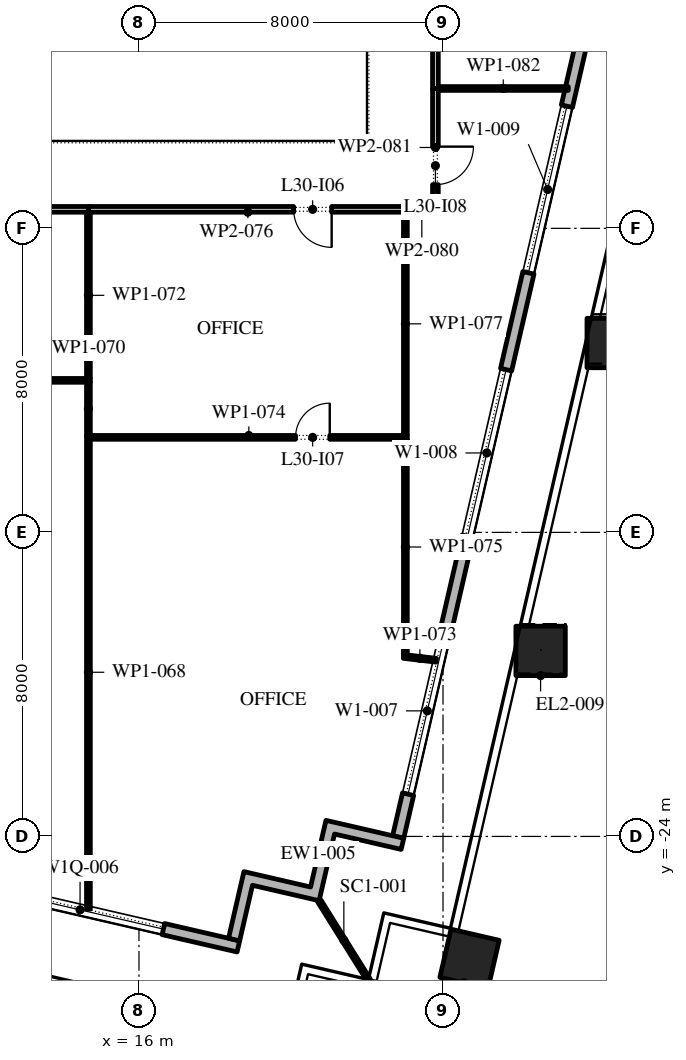
"""IFC4 building model, lengths in metres.
Left out: names, types, materials, properties, quantities, classifications, styles, units other than length and angle.
Written with IfcOpenShell. Run it as: python <this file> out.ifc"""

import sys

from ifc_helpers import new_model, si_unit, direction, frame, frame_2d, origin, origin_2d, place, context, subcontext, project, spatial, polyline, rectangle, outline, extrude, element, fill, save


model = new_model("IFC4")
c1 = context("Model", 3, precision=1e-05, world=origin(), true_north=direction((0.0, 1.0)))
c2 = subcontext(c1, "Body", "Model", "MODEL_VIEW")
j1 = project(units=[si_unit("LENGTHUNIT", "METRE"), si_unit("PLANEANGLEUNIT", "RADIAN")], contexts=[c1])
p1 = place(None, origin())
s1 = spatial("IfcSite", under=j1, at=p1, CompositionType="ELEMENT")
p2 = place(p1, origin())
s2 = spatial("IfcBuilding", under=s1, at=p2, CompositionType="ELEMENT")
p3 = place(p2, frame((0.0, 0.0, 139.2)))
s3 = spatial("IfcBuildingStorey", under=s2, at=p3, CompositionType="ELEMENT", Elevation=139.2)
p4 = place(p3, frame((24.698, -27.22, 0.0), z_axis=(0.0, 0.0, 1.0), x_axis=(0.974370064785, -0.224951054344, 0.0)))
e1 = element("IfcColumn", 1, at=p4, inside=s3, PredefinedType="COLUMN", context=c2, shape_type="SweptSolid", body=[
    extrude(rectangle(XDim=1.3, YDim=1.3, at=origin_2d()), origin(), (0.0, 0.0, 1.0), 4.2),
])
p5 = place(p3, frame((26.568, -19.119, 0.0), z_axis=(0.002848100182, 0.012671139583, 0.999915661717), x_axis=(-0.975657656042, 0.219299197918, 0.0)))
e2 = element("IfcColumn", 2, at=p5, inside=s3, PredefinedType="COLUMN", context=c2, shape_type="SweptSolid", body=[
    extrude(rectangle(XDim=1.3, YDim=1.3, at=origin_2d()), origin(), (0.0, 0.0, 1.0), 4.2),
])
p6 = place(p3, frame((28.438, -11.018, 0.0), z_axis=(0.005869091843, 0.025277771797, 0.999663237302), x_axis=(-0.974088391429, 0.226167649504, 0.0)))
e3 = element("IfcColumn", 3, at=p6, inside=s3, PredefinedType="COLUMN", context=c2, shape_type="SweptSolid", body=[
    extrude(rectangle(XDim=1.3, YDim=1.3, at=origin_2d()), origin(), (0.0, 0.0, 1.0), 4.201),
])
p7 = place(p3, frame((22.539, -28.569, 0.0), z_axis=(0.0, 0.0, 1.0), x_axis=(0.974370064785, -0.224951054344, 0.0)))
e4 = element("IfcColumn", 4, at=p7, inside=s3, PredefinedType="COLUMN", context=c2, shape_type="SweptSolid", body=[
    extrude(rectangle(XDim=1.3, YDim=1.3, at=origin_2d()), origin(), (0.0, 0.0, 1.0), 4.2),
])
p8 = place(p3, frame((-31.078, -15.421, 0.0), z_axis=(0.0, 0.0, 1.0), x_axis=(0.974370456532, -0.224949357493, 0.0)))
e5 = element("IfcWall", 5, at=p8, inside=s3, PredefinedType="STANDARD", context=c2, shape_type="SweptSolid", body=[
    extrude(rectangle(XDim=51.0, YDim=0.3, at=frame_2d((25.5, 0.0))), origin(), (0.0, 0.0, 1.0), 4.0),
])
p9 = place(p8, frame((1.875, 0.0, 0.45)))
e6 = element("IfcOpeningElement", 6, at=p9, cuts=e5, PredefinedType="OPENING", context=c2, shape_type="SweptSolid", body=[
    extrude(rectangle(XDim=4.5, YDim=2.65, at=frame_2d((2.25, 1.325))), frame((0.0, 0.16, 0.0), z_axis=(0.0, -1.0, 0.0), x_axis=(1.0, 0.0, 0.0)), (0.0, 0.0, 1.0), 0.32),
])
p10 = place(p8, frame((10.275, 0.0, 0.45)))
e7 = element("IfcOpeningElement", 7, at=p10, cuts=e5, PredefinedType="OPENING", context=c2, shape_type="SweptSolid", body=[
    extrude(rectangle(XDim=4.5, YDim=2.525, at=frame_2d((2.25, 1.262))), frame((0.0, 0.16, 0.0), z_axis=(0.0, -1.0, 0.0), x_axis=(1.0, 0.0, 0.0)), (0.0, 0.0, 1.0), 0.32),
])
p11 = place(p8, frame((18.825, 0.0, 0.45)))
e8 = element("IfcOpeningElement", 8, at=p11, cuts=e5, PredefinedType="OPENING", context=c2, shape_type="SweptSolid", body=[
    extrude(rectangle(XDim=4.5, YDim=2.5, at=frame_2d((2.25, 1.25))), frame((0.0, 0.16, 0.0), z_axis=(0.0, -1.0, 0.0), x_axis=(1.0, 0.0, 0.0)), (0.0, 0.0, 1.0), 0.32),
])
p12 = place(p8, frame((28.425, 0.0, 0.0)))
e9 = element("IfcOpeningElement", 9, at=p12, cuts=e5, PredefinedType="OPENING", context=c2, shape_type="SweptSolid", body=[
    extrude(rectangle(XDim=2.4, YDim=2.9, at=frame_2d((1.2, 1.45))), frame((0.0, 0.16, 0.0), z_axis=(0.0, -1.0, 0.0), x_axis=(1.0, 0.0, 0.0)), (0.0, 0.0, 1.0), 0.32),
])
p13 = place(p8, frame((35.925, 0.0, 0.45)))
e10 = element("IfcOpeningElement", 10, at=p13, cuts=e5, PredefinedType="OPENING", context=c2, shape_type="SweptSolid", body=[
    extrude(rectangle(XDim=4.5, YDim=2.45, at=frame_2d((2.25, 1.225))), frame((0.0, 0.16, 0.0), z_axis=(0.0, -1.0, 0.0), x_axis=(1.0, 0.0, 0.0)), (0.0, 0.0, 1.0), 0.32),
])
p14 = place(p8, frame((44.475, 0.0, 0.45)))
e11 = element("IfcOpeningElement", 11, at=p14, cuts=e5, PredefinedType="OPENING", context=c2, shape_type="SweptSolid", body=[
    extrude(rectangle(XDim=4.5, YDim=2.45, at=frame_2d((2.25, 1.225))), frame((0.0, 0.16, 0.0), z_axis=(0.0, -1.0, 0.0), x_axis=(1.0, 0.0, 0.0)), (0.0, 0.0, 1.0), 0.32),
])
p15 = place(p3, frame((22.82, -24.016, 0.0), z_axis=(0.0, 0.0, 1.0), x_axis=(0.224953880882, 0.974369412223, 0.0)))
e12 = element("IfcWall", 12, at=p15, inside=s3, PredefinedType="STANDARD", context=c2, shape_type="SweptSolid", body=[
    extrude(rectangle(XDim=49.5, YDim=0.3, at=frame_2d((24.75, 0.0))), origin(), (0.0, 0.0, 1.0), 4.0),
])
p16 = place(p15, frame((1.157, 0.0, 0.45)))
e13 = element("IfcOpeningElement", 13, at=p16, cuts=e12, PredefinedType="OPENING", context=c2, shape_type="SweptSolid", body=[
    extrude(rectangle(XDim=4.5, YDim=3.05, at=frame_2d((2.25, 1.525))), frame((0.0, 0.16, 0.0), z_axis=(0.0, -1.0, 0.0), x_axis=(1.0, 0.0, 0.0)), (0.0, 0.0, 1.0), 0.32),
])
p17 = place(p15, frame((8.121, 0.0, 0.45)))
e14 = element("IfcOpeningElement", 14, at=p17, cuts=e12, PredefinedType="OPENING", context=c2, shape_type="SweptSolid", body=[
    extrude(rectangle(XDim=4.5, YDim=3.05, at=frame_2d((2.25, 1.525))), frame((0.0, 0.16, 0.0), z_axis=(0.0, -1.0, 0.0), x_axis=(1.0, 0.0, 0.0)), (0.0, 0.0, 1.0), 0.32),
])
p18 = place(p15, frame((15.236, 0.0, 0.45)))
e15 = element("IfcOpeningElement", 15, at=p18, cuts=e12, PredefinedType="OPENING", context=c2, shape_type="SweptSolid", body=[
    extrude(rectangle(XDim=4.5, YDim=3.05, at=frame_2d((2.25, 1.525))), frame((0.0, 0.16, 0.0), z_axis=(0.0, -1.0, 0.0), x_axis=(1.0, 0.0, 0.0)), (0.0, 0.0, 1.0), 0.32),
])
p19 = place(p15, frame((23.4, 0.0, 0.0)))
e16 = element("IfcOpeningElement", 16, at=p19, cuts=e12, PredefinedType="OPENING", context=c2, shape_type="SweptSolid", body=[
    extrude(rectangle(XDim=2.4, YDim=3.5, at=frame_2d((1.2, 1.75))), frame((0.0, 0.16, 0.0), z_axis=(0.0, -1.0, 0.0), x_axis=(1.0, 0.0, 0.0)), (0.0, 0.0, 1.0), 0.32),
])
p20 = place(p15, frame((29.464, 0.0, 0.45)))
e17 = element("IfcOpeningElement", 17, at=p20, cuts=e12, PredefinedType="OPENING", context=c2, shape_type="SweptSolid", body=[
    extrude(rectangle(XDim=4.5, YDim=2.875, at=frame_2d((2.25, 1.438))), frame((0.0, 0.16, 0.0), z_axis=(0.0, -1.0, 0.0), x_axis=(1.0, 0.0, 0.0)), (0.0, 0.0, 1.0), 0.32),
])
p21 = place(p15, frame((36.579, 0.0, 0.45)))
e18 = element("IfcOpeningElement", 18, at=p21, cuts=e12, PredefinedType="OPENING", context=c2, shape_type="SweptSolid", body=[
    extrude(rectangle(XDim=4.5, YDim=2.825, at=frame_2d((2.25, 1.413))), frame((0.0, 0.16, 0.0), z_axis=(0.0, -1.0, 0.0), x_axis=(1.0, 0.0, 0.0)), (0.0, 0.0, 1.0), 0.32),
])
p22 = place(p15, frame((43.693, 0.0, 0.45)))
e19 = element("IfcOpeningElement", 19, at=p22, cuts=e12, PredefinedType="OPENING", context=c2, shape_type="SweptSolid", body=[
    extrude(rectangle(XDim=4.5, YDim=2.75, at=frame_2d((2.25, 1.375))), frame((0.0, 0.16, 0.0), z_axis=(0.0, -1.0, 0.0), x_axis=(1.0, 0.0, 0.0)), (0.0, 0.0, 1.0), 0.32),
])
p23 = place(p3, origin())
e20 = element("IfcWall", 20, at=p23, inside=s3, PredefinedType="STANDARD", context=c2, shape_type="SweptSolid", body=[
    extrude(outline(polyline([(20.515, -25.331), (20.92, -23.577), (22.967, -24.049), (22.899, -24.342), (21.145, -23.937), (20.74, -25.691), (18.986, -25.286), (18.649, -26.747), (18.357, -26.68), (18.762, -24.926), (20.515, -25.331)])), origin(), (0.0, 0.0, 1.0), 4.0),
])
p24 = place(p3, frame((20.74, -25.691, -0.05), z_axis=(0.0, 0.0, 1.0), x_axis=(0.529972121605, -0.848015064914, 0.0)))
e21 = element("IfcWall", 21, at=p24, inside=s3, PredefinedType="STANDARD", context=c2, shape_type="SweptSolid", body=[
    extrude(rectangle(XDim=2.455, YDim=0.1, at=frame_2d((1.228, 0.0))), origin(), (0.0, 0.0, 1.0), 4.05),
])
p25 = place(p3, frame((14.67, -13.45, 0.0), z_axis=(0.0, 0.0, 1.0), x_axis=(0.0, -1.0, 0.0)))
e22 = element("IfcWall", 22, at=p25, inside=s3, PredefinedType="PARTITIONING", context=c2, shape_type="SweptSolid", body=[
    extrude(rectangle(XDim=12.461, YDim=0.1, at=frame_2d((6.23, 0.0))), origin(), (0.0, 0.0, 1.0), 4.0),
])
p26 = place(p3, frame((14.72, -12.0, 0.0), z_axis=(0.0, 0.0, 1.0), x_axis=(-1.0, 0.0, 0.0)))
e23 = element("IfcWall", 23, at=p26, inside=s3, PredefinedType="PARTITIONING", context=c2, shape_type="SweptSolid", body=[
    extrude(rectangle(XDim=12.68, YDim=0.1, at=frame_2d((6.34, 0.0))), origin(), (0.0, 0.0, 1.0), 4.0),
])
p27 = place(p26, frame((5.88, 0.0, 0.0)))
e24 = element("IfcOpeningElement", 24, at=p27, cuts=e23, PredefinedType="OPENING", context=c2, shape_type="SweptSolid", body=[
    extrude(rectangle(XDim=0.9, YDim=2.1, at=frame_2d((0.45, 1.05))), frame((0.0, 0.06, 0.0), z_axis=(0.0, -1.0, 0.0), x_axis=(1.0, 0.0, 0.0)), (0.0, 0.0, 1.0), 0.12),
])
p28 = place(p3, frame((14.67, -12.05, 0.0), z_axis=(0.0, 0.0, 1.0), x_axis=(0.0, -1.0, 0.0)))
e25 = element("IfcWall", 25, at=p28, inside=s3, PredefinedType="PARTITIONING", context=c2, shape_type="SweptSolid", body=[
    extrude(rectangle(XDim=1.4, YDim=0.1, at=frame_2d((0.7, 0.0))), origin(), (0.0, 0.0, 1.0), 4.0),
])
p29 = place(p3, frame((14.67, -7.5, 0.0), z_axis=(0.0, 0.0, 1.0), x_axis=(-1.0, 0.0, 0.0)))
e26 = element("IfcWall", 26, at=p29, inside=s3, PredefinedType="PARTITIONING", context=c2, shape_type="SweptSolid", body=[
    extrude(rectangle(XDim=6.395, YDim=0.15, at=frame_2d((3.198, 0.0))), origin(), (0.0, 0.0, 1.0), 4.0),
])
p30 = place(p29, frame((2.82, 0.0, 0.0)))
e27 = element("IfcOpeningElement", 27, at=p30, cuts=e26, PredefinedType="OPENING", context=c2, shape_type="SweptSolid", body=[
    extrude(rectangle(XDim=1.0, YDim=2.1, at=frame_2d((0.5, 1.05))), frame((0.0, 0.085, 0.0), z_axis=(0.0, -1.0, 0.0), x_axis=(1.0, 0.0, 0.0)), (0.0, 0.0, 1.0), 0.17),
])
p31 = place(p3, frame((14.67, -7.575, 0.0), z_axis=(0.0, 0.0, 1.0), x_axis=(0.0, -1.0, 0.0)))
e28 = element("IfcWall", 28, at=p31, inside=s3, PredefinedType="PARTITIONING", context=c2, shape_type="SweptSolid", body=[
    extrude(rectangle(XDim=4.375, YDim=0.1, at=frame_2d((2.188, 0.0))), origin(), (0.0, 0.0, 1.0), 4.0),
])
p32 = place(p3, frame((22.96, -19.264, 0.0), z_axis=(0.0, 0.0, 1.0), x_axis=(0.993326131588, -0.115339482852, 0.0)))
e29 = element("IfcWall", 29, at=p32, inside=s3, PredefinedType="PARTITIONING", context=c2, shape_type="SweptSolid", body=[
    extrude(rectangle(XDim=0.868, YDim=0.1, at=frame_2d((0.434, 0.0))), origin(), (0.0, 0.0, 1.0), 4.0),
])
p33 = place(p3, frame((23.06, -13.5, 0.0), z_axis=(0.0, 0.0, 1.0), x_axis=(-1.0, 0.0, 0.0)))
e30 = element("IfcWall", 30, at=p33, inside=s3, PredefinedType="PARTITIONING", context=c2, shape_type="SweptSolid", body=[
    extrude(rectangle(XDim=8.34, YDim=0.1, at=frame_2d((4.17, 0.0))), origin(), (0.0, 0.0, 1.0), 4.0),
])
p34 = place(p33, frame((2.04, 0.0, 0.0)))
e31 = element("IfcOpeningElement", 31, at=p34, cuts=e30, PredefinedType="OPENING", context=c2, shape_type="SweptSolid", body=[
    extrude(rectangle(XDim=0.9, YDim=2.1, at=frame_2d((0.45, 1.05))), frame((0.0, 0.06, 0.0), z_axis=(0.0, -1.0, 0.0), x_axis=(1.0, 0.0, 0.0)), (0.0, 0.0, 1.0), 0.12),
])
p35 = place(p3, frame((23.01, -13.55, 0.0), z_axis=(0.0, 0.0, 1.0), x_axis=(0.0, -1.0, 0.0)))
e32 = element("IfcWall", 32, at=p35, inside=s3, PredefinedType="PARTITIONING", context=c2, shape_type="SweptSolid", body=[
    extrude(rectangle(XDim=5.67, YDim=0.1, at=frame_2d((2.835, 0.0))), origin(), (0.0, 0.0, 1.0), 4.0),
])
p36 = place(p3, frame((23.06, -7.5, 0.0), z_axis=(0.0, 0.0, 1.0), x_axis=(-1.0, 0.0, 0.0)))
e33 = element("IfcWall", 33, at=p36, inside=s3, PredefinedType="PARTITIONING", context=c2, shape_type="SweptSolid", body=[
    extrude(rectangle(XDim=8.39, YDim=0.15, at=frame_2d((4.195, 0.0))), origin(), (0.0, 0.0, 1.0), 4.0),
])
p37 = place(p36, frame((1.99, 0.0, 0.0)))
e34 = element("IfcOpeningElement", 34, at=p37, cuts=e33, PredefinedType="OPENING", context=c2, shape_type="SweptSolid", body=[
    extrude(rectangle(XDim=1.0, YDim=2.1, at=frame_2d((0.5, 1.05))), frame((0.0, 0.085, 0.0), z_axis=(0.0, -1.0, 0.0), x_axis=(1.0, 0.0, 0.0)), (0.0, 0.0, 1.0), 0.17),
])
p38 = place(p3, frame((23.01, -7.575, 0.0), z_axis=(0.0, 0.0, 1.0), x_axis=(0.0, -1.0, 0.0)))
e35 = element("IfcWall", 35, at=p38, inside=s3, PredefinedType="PARTITIONING", context=c2, shape_type="SweptSolid", body=[
    extrude(rectangle(XDim=5.875, YDim=0.1, at=frame_2d((2.938, 0.0))), origin(), (0.0, 0.0, 1.0), 4.0),
])
p39 = place(p3, frame((23.875, -7.5, 0.0), z_axis=(0.0, 0.0, 1.0), x_axis=(-1.0, 0.0, 0.0)))
e36 = element("IfcWall", 36, at=p39, inside=s3, PredefinedType="PARTITIONING", context=c2, shape_type="SweptSolid", body=[
    extrude(rectangle(XDim=0.865, YDim=0.15, at=frame_2d((0.433, 0.0))), origin(), (0.0, 0.0, 1.0), 4.0),
])
p40 = place(p3, frame((23.8, -4.32, 0.0), z_axis=(0.0, 0.0, 1.0), x_axis=(0.0, -1.0, 0.0)))
e37 = element("IfcWall", 37, at=p40, inside=s3, PredefinedType="PARTITIONING", context=c2, shape_type="SweptSolid", body=[
    extrude(rectangle(XDim=3.105, YDim=0.15, at=frame_2d((1.552, 0.0))), origin(), (0.0, 0.0, 1.0), 4.0),
])
p41 = place(p40, frame((1.53, 0.0, 0.0)))
e38 = element("IfcOpeningElement", 38, at=p41, cuts=e37, PredefinedType="OPENING", context=c2, shape_type="SweptSolid", body=[
    extrude(rectangle(XDim=1.0, YDim=2.1, at=frame_2d((0.5, 1.05))), frame((0.0, 0.085, 0.0), z_axis=(0.0, -1.0, 0.0), x_axis=(1.0, 0.0, 0.0)), (0.0, 0.0, 1.0), 0.17),
])
p42 = place(p3, frame((23.875, -4.32, 0.0), z_axis=(0.0, 0.0, 1.0), x_axis=(1.0, 0.0, 0.0)))
e39 = element("IfcWall", 39, at=p42, inside=s3, PredefinedType="PARTITIONING", context=c2, shape_type="SweptSolid", body=[
    extrude(rectangle(XDim=3.421, YDim=0.1, at=frame_2d((1.71, 0.0))), origin(), (0.0, 0.0, 1.0), 4.0),
])
p43 = place(p3, frame((23.8, 10.44, 0.0), z_axis=(0.0, 0.0, 1.0), x_axis=(0.0, -1.0, 0.0)))
e40 = element("IfcWall", 40, at=p43, inside=s3, PredefinedType="PARTITIONING", context=c2, shape_type="SweptSolid", body=[
    extrude(rectangle(XDim=14.76, YDim=0.15, at=frame_2d((7.38, 0.0))), origin(), (0.0, 0.0, 1.0), 4.0),
])
p44 = place(p43, frame((9.86, 0.0, 0.0)))
e41 = element("IfcOpeningElement", 41, at=p44, cuts=e40, PredefinedType="OPENING", context=c2, shape_type="SweptSolid", body=[
    extrude(rectangle(XDim=1.0, YDim=2.1, at=frame_2d((0.5, 1.05))), frame((0.0, 0.085, 0.0), z_axis=(0.0, -1.0, 0.0), x_axis=(1.0, 0.0, 0.0)), (0.0, 0.0, 1.0), 0.17),
])
p45 = place(p14, origin())
e42 = element("IfcWindow", 42, at=p45, inside=s3, PartitioningType="DOUBLE_PANEL_VERTICAL", PredefinedType="WINDOW", context=c2, shape_type="SweptSolid", body=[
    extrude(rectangle(XDim=4.5, YDim=2.45, at=frame_2d((2.25, 1.225))), frame((0.0, 0.03, 0.0), z_axis=(0.0, -1.0, 0.0), x_axis=(1.0, 0.0, 0.0)), (0.0, 0.0, 1.0), 0.06),
])
fill(e11, e42)
p46 = place(p16, origin())
e43 = element("IfcWindow", 43, at=p46, inside=s3, PartitioningType="DOUBLE_PANEL_VERTICAL", PredefinedType="WINDOW", context=c2, shape_type="SweptSolid", body=[
    extrude(rectangle(XDim=4.5, YDim=3.05, at=frame_2d((2.25, 1.525))), frame((0.0, 0.03, 0.0), z_axis=(0.0, -1.0, 0.0), x_axis=(1.0, 0.0, 0.0)), (0.0, 0.0, 1.0), 0.06),
])
fill(e13, e43)
p47 = place(p17, origin())
e44 = element("IfcWindow", 44, at=p47, inside=s3, PartitioningType="DOUBLE_PANEL_VERTICAL", PredefinedType="WINDOW", context=c2, shape_type="SweptSolid", body=[
    extrude(rectangle(XDim=4.5, YDim=3.05, at=frame_2d((2.25, 1.525))), frame((0.0, 0.03, 0.0), z_axis=(0.0, -1.0, 0.0), x_axis=(1.0, 0.0, 0.0)), (0.0, 0.0, 1.0), 0.06),
])
fill(e14, e44)
p48 = place(p18, origin())
e45 = element("IfcWindow", 45, at=p48, inside=s3, PartitioningType="DOUBLE_PANEL_VERTICAL", PredefinedType="WINDOW", context=c2, shape_type="SweptSolid", body=[
    extrude(rectangle(XDim=4.5, YDim=3.05, at=frame_2d((2.25, 1.525))), frame((0.0, 0.03, 0.0), z_axis=(0.0, -1.0, 0.0), x_axis=(1.0, 0.0, 0.0)), (0.0, 0.0, 1.0), 0.06),
])
fill(e15, e45)
p49 = place(p37, origin())
e46 = element("IfcDoor", 46, at=p49, inside=s3, OperationType="SINGLE_SWING_RIGHT", PredefinedType="DOOR", context=c2, shape_type="SweptSolid", body=[
    extrude(rectangle(XDim=1.0, YDim=2.1, at=frame_2d((0.5, 1.05))), frame((0.0, 0.025, 0.0), z_axis=(0.0, -1.0, 0.0), x_axis=(1.0, 0.0, 0.0)), (0.0, 0.0, 1.0), 0.05),
])
fill(e34, e46)
p50 = place(p34, frame((0.9, 0.0, 0.0), z_axis=(0.0, 0.0, 1.0), x_axis=(-1.0, 0.0, 0.0)))
e47 = element("IfcDoor", 47, at=p50, inside=s3, OperationType="SINGLE_SWING_LEFT", PredefinedType="DOOR", context=c2, shape_type="SweptSolid", body=[
    extrude(rectangle(XDim=0.9, YDim=2.1, at=frame_2d((0.45, 1.05))), frame((0.0, 0.025, 0.0), z_axis=(0.0, -1.0, 0.0), x_axis=(1.0, 0.0, 0.0)), (0.0, 0.0, 1.0), 0.05),
])
fill(e31, e47)
p51 = place(p41, origin())
e48 = element("IfcDoor", 48, at=p51, inside=s3, OperationType="SINGLE_SWING_RIGHT", PredefinedType="DOOR", context=c2, shape_type="SweptSolid", body=[
    extrude(rectangle(XDim=1.0, YDim=2.1, at=frame_2d((0.5, 1.05))), frame((0.0, 0.025, 0.0), z_axis=(0.0, -1.0, 0.0), x_axis=(1.0, 0.0, 0.0)), (0.0, 0.0, 1.0), 0.05),
])
fill(e38, e48)
save(model, sys.argv[1])
